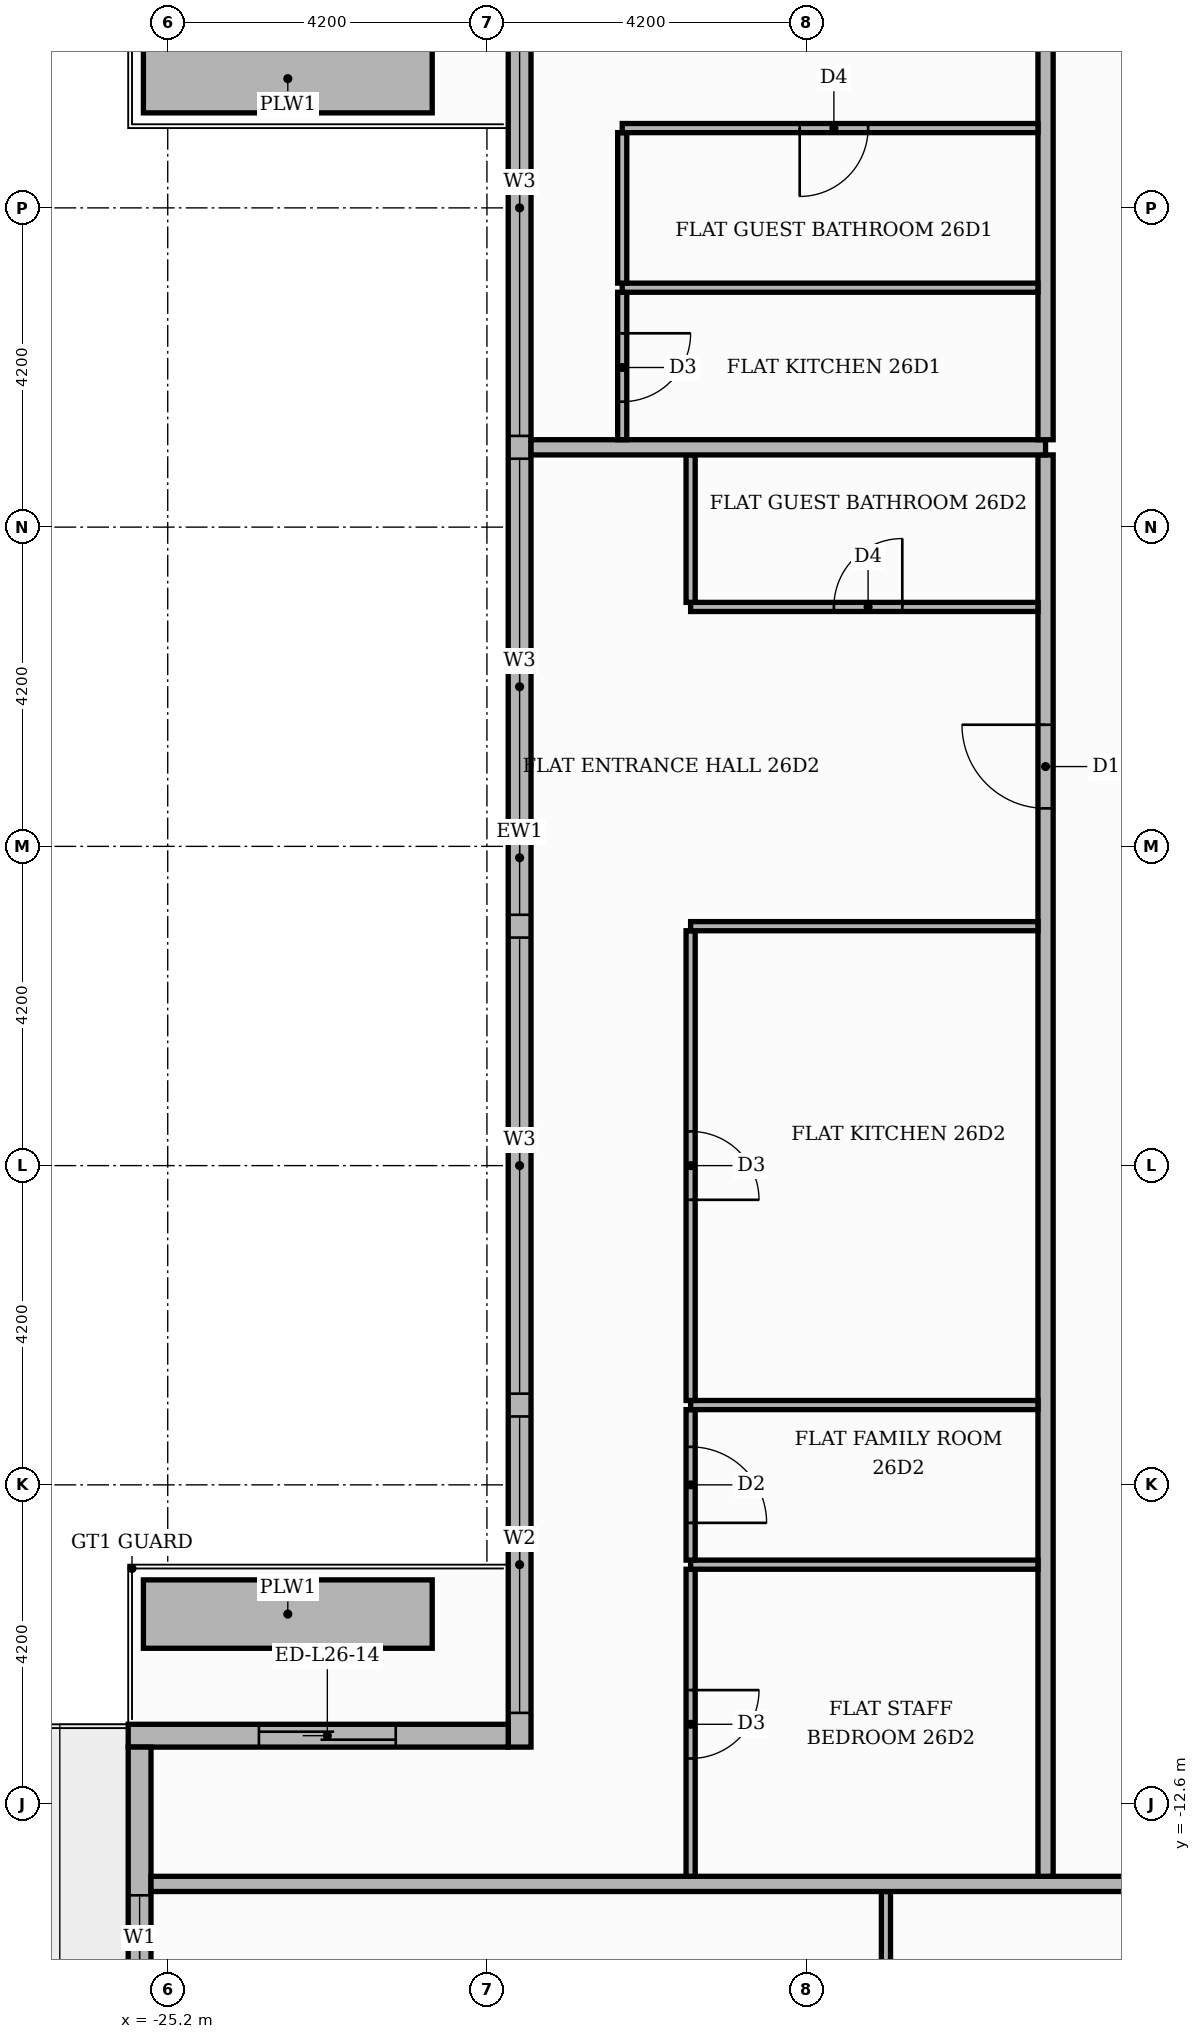
"""IFC4 building model, lengths in metres.
Left out: names, types, materials, properties, quantities, classifications, styles, units other than length and angle.
Written with IfcOpenShell. Run it as: python <this file> out.ifc"""

import sys

from ifc_helpers import new_model, si_unit, direction, frame, frame_2d, origin, place, context, subcontext, project, spatial, rectangle, extrude, element, fill, save


model = new_model("IFC4")
c1 = context("Model", 3, precision=1e-05, world=origin(), true_north=direction((0.0, 1.0)))
c2 = subcontext(c1, "Body", "Model", "MODEL_VIEW")
j1 = project(units=[si_unit("LENGTHUNIT", "METRE"), si_unit("PLANEANGLEUNIT", "RADIAN")], contexts=[c1])
p1 = place(None, origin())
s1 = spatial("IfcSite", under=j1, at=p1, CompositionType="ELEMENT")
p2 = place(p1, origin())
s2 = spatial("IfcBuilding", under=s1, at=p2, CompositionType="ELEMENT")
p3 = place(p2, frame((0.0, 0.0, 110.4)))
s3 = spatial("IfcBuildingStorey", under=s2, at=p3, CompositionType="ELEMENT", Elevation=110.4)
p4 = place(p3, frame((-20.57, 11.55, 0.0), z_axis=(0.0, 0.0, 1.0), x_axis=(0.0, -1.0, 0.0)))
e1 = element("IfcWall", 1, at=p4, inside=s3, PredefinedType="STANDARD", context=c2, shape_type="SweptSolid", body=[
    extrude(rectangle(XDim=23.4, YDim=0.3, at=frame_2d((11.7, 0.0))), origin(), (0.0, 0.0, 1.0), 3.48),
])
p5 = place(p4, frame((0.15, 0.0, 0.9)))
e2 = element("IfcOpeningElement", 2, at=p5, cuts=e1, PredefinedType="OPENING", context=c2, shape_type="SweptSolid", body=[
    extrude(rectangle(XDim=6.0, YDim=2.1, at=frame_2d((3.0, 1.05))), frame((0.0, 0.16, 0.0), z_axis=(0.0, -1.0, 0.0), x_axis=(1.0, 0.0, 0.0)), (0.0, 0.0, 1.0), 0.32),
])
p6 = place(p4, frame((6.45, 0.0, 0.9)))
e3 = element("IfcOpeningElement", 3, at=p6, cuts=e1, PredefinedType="OPENING", context=c2, shape_type="SweptSolid", body=[
    extrude(rectangle(XDim=6.0, YDim=2.1, at=frame_2d((3.0, 1.05))), frame((0.0, 0.16, 0.0), z_axis=(0.0, -1.0, 0.0), x_axis=(1.0, 0.0, 0.0)), (0.0, 0.0, 1.0), 0.32),
])
p7 = place(p4, frame((12.75, 0.0, 0.9)))
e4 = element("IfcOpeningElement", 4, at=p7, cuts=e1, PredefinedType="OPENING", context=c2, shape_type="SweptSolid", body=[
    extrude(rectangle(XDim=6.0, YDim=2.1, at=frame_2d((3.0, 1.05))), frame((0.0, 0.16, 0.0), z_axis=(0.0, -1.0, 0.0), x_axis=(1.0, 0.0, 0.0)), (0.0, 0.0, 1.0), 0.32),
])
p8 = place(p4, frame((19.05, 0.0, 0.9)))
e5 = element("IfcOpeningElement", 5, at=p8, cuts=e1, PredefinedType="OPENING", context=c2, shape_type="SweptSolid", body=[
    extrude(rectangle(XDim=3.9, YDim=2.1, at=frame_2d((1.95, 1.05))), frame((0.0, 0.16, 0.0), z_axis=(0.0, -1.0, 0.0), x_axis=(1.0, 0.0, 0.0)), (0.0, 0.0, 1.0), 0.32),
])
p9 = place(p3, frame((-20.72, -11.7, 0.0), z_axis=(0.0, 0.0, 1.0), x_axis=(-1.0, 0.0, 0.0)))
e6 = element("IfcWall", 6, at=p9, inside=s3, PredefinedType="STANDARD", context=c2, shape_type="SweptSolid", body=[
    extrude(rectangle(XDim=5.0, YDim=0.3, at=frame_2d((2.5, 0.0))), origin(), (0.0, 0.0, 1.0), 3.48),
])
p10 = place(p9, frame((1.48, 0.0, 0.0)))
e7 = element("IfcOpeningElement", 7, at=p10, cuts=e6, PredefinedType="OPENING", context=c2, shape_type="SweptSolid", body=[
    extrude(rectangle(XDim=1.8, YDim=2.4, at=frame_2d((0.9, 1.2))), frame((0.0, 0.16, 0.0), z_axis=(0.0, -1.0, 0.0), x_axis=(1.0, 0.0, 0.0)), (0.0, 0.0, 1.0), 0.32),
])
p11 = place(p3, frame((-25.57, -11.85, 0.0), z_axis=(0.0, 0.0, 1.0), x_axis=(0.0, -1.0, 0.0)))
e8 = element("IfcWall", 8, at=p11, inside=s3, PredefinedType="STANDARD", context=c2, shape_type="SweptSolid", body=[
    extrude(rectangle(XDim=4.35, YDim=0.3, at=frame_2d((2.175, 0.0))), origin(), (0.0, 0.0, 1.0), 3.48),
])
p12 = place(p11, frame((1.95, 0.0, 0.9)))
e9 = element("IfcOpeningElement", 9, at=p12, cuts=e8, PredefinedType="OPENING", context=c2, shape_type="SweptSolid", body=[
    extrude(rectangle(XDim=1.8, YDim=2.1, at=frame_2d((0.9, 1.05))), frame((0.0, 0.16, 0.0), z_axis=(0.0, -1.0, 0.0), x_axis=(1.0, 0.0, 0.0)), (0.0, 0.0, 1.0), 0.32),
])
for number, where, z_axis, x_axis in (
    (10, (-25.52, -10.1, 0.0), (0.0, 0.0, 1.0), (1.0, 0.0, 0.0)),
    (11, (-25.52, 10.1, 0.0), (0.0, 0.0, 1.0), (1.0, 0.0, 0.0)),
):
    element("IfcWall", number, at=place(p3, frame(where, z_axis=z_axis, x_axis=x_axis)), inside=s3, PredefinedType="MOVABLE", context=c2, shape_type="SweptSolid", body=[
        extrude(rectangle(XDim=3.8, YDim=0.9, at=frame_2d((1.9, 0.0))), origin(), (0.0, 0.0, 1.0), 0.6),
    ])
p13 = place(p3, frame((-15.75, -20.66, 0.0), z_axis=(0.0, 0.0, 1.0), x_axis=(0.0, 1.0, 0.0)))
e12 = element("IfcWall", 12, at=p13, inside=s3, PredefinedType="PARTITIONING", context=c2, shape_type="SweptSolid", body=[
    extrude(rectangle(XDim=6.91, YDim=0.12, at=frame_2d((3.455, 0.0))), origin(), (0.0, 0.0, 1.0), 3.48),
])
p14 = place(p13, frame((3.025, 0.0, 0.0)))
e13 = element("IfcOpeningElement", 13, at=p14, cuts=e12, PredefinedType="OPENING", context=c2, shape_type="SweptSolid", body=[
    extrude(rectangle(XDim=0.9, YDim=2.1, at=frame_2d((0.45, 1.05))), frame((0.0, 0.07, 0.0), z_axis=(0.0, -1.0, 0.0), x_axis=(1.0, 0.0, 0.0)), (0.0, 0.0, 1.0), 0.14),
])
p15 = place(p3, frame((-25.42, -13.65, 0.0), z_axis=(0.0, 0.0, 1.0), x_axis=(1.0, 0.0, 0.0)))
e14 = element("IfcWall", 14, at=p15, inside=s3, PredefinedType="PARTITIONING", context=c2, shape_type="SweptSolid", body=[
    extrude(rectangle(XDim=39.07, YDim=0.2, at=frame_2d((19.535, 0.0))), origin(), (0.0, 0.0, 1.0), 3.48),
])
p16 = place(p15, frame((13.32, 0.0, 0.0)))
e15 = element("IfcOpeningElement", 15, at=p16, cuts=e14, PredefinedType="OPENING", context=c2, shape_type="SweptSolid", body=[
    extrude(rectangle(XDim=1.1, YDim=2.4, at=frame_2d((0.55, 1.2))), frame((0.0, 0.11, 0.0), z_axis=(0.0, -1.0, 0.0), x_axis=(1.0, 0.0, 0.0)), (0.0, 0.0, 1.0), 0.22),
])
p17 = place(p3, frame((-18.32, -13.55, 0.0), z_axis=(0.0, 0.0, 1.0), x_axis=(0.0, 1.0, 0.0)))
e16 = element("IfcWall", 16, at=p17, inside=s3, PredefinedType="PARTITIONING", context=c2, shape_type="SweptSolid", body=[
    extrude(rectangle(XDim=4.04, YDim=0.12, at=frame_2d((2.02, 0.0))), origin(), (0.0, 0.0, 1.0), 3.48),
])
p18 = place(p17, frame((1.55, 0.0, 0.0)))
e17 = element("IfcOpeningElement", 17, at=p18, cuts=e16, PredefinedType="OPENING", context=c2, shape_type="SweptSolid", body=[
    extrude(rectangle(XDim=0.9, YDim=2.1, at=frame_2d((0.45, 1.05))), frame((0.0, 0.07, 0.0), z_axis=(0.0, -1.0, 0.0), x_axis=(1.0, 0.0, 0.0)), (0.0, 0.0, 1.0), 0.14),
])
p19 = place(p3, frame((-13.65, -13.55, 0.0), z_axis=(0.0, 0.0, 1.0), x_axis=(0.0, 1.0, 0.0)))
e18 = element("IfcWall", 18, at=p19, inside=s3, PredefinedType="PARTITIONING", context=c2, shape_type="SweptSolid", body=[
    extrude(rectangle(XDim=18.7, YDim=0.2, at=frame_2d((9.35, 0.0))), origin(), (0.0, 0.0, 1.0), 3.48),
])
p20 = place(p19, frame((14.05, 0.0, 0.0)))
e19 = element("IfcOpeningElement", 19, at=p20, cuts=e18, PredefinedType="OPENING", context=c2, shape_type="SweptSolid", body=[
    extrude(rectangle(XDim=1.1, YDim=2.4, at=frame_2d((0.55, 1.2))), frame((0.0, 0.11, 0.0), z_axis=(0.0, -1.0, 0.0), x_axis=(1.0, 0.0, 0.0)), (0.0, 0.0, 1.0), 0.22),
])
p21 = place(p3, frame((-18.32, -9.45, 0.0), z_axis=(0.0, 0.0, 1.0), x_axis=(1.0, 0.0, 0.0)))
e20 = element("IfcWall", 20, at=p21, inside=s3, PredefinedType="PARTITIONING", context=c2, shape_type="SweptSolid", body=[
    extrude(rectangle(XDim=4.57, YDim=0.12, at=frame_2d((2.285, 0.0))), origin(), (0.0, 0.0, 1.0), 3.48),
])
p22 = place(p3, frame((-18.32, -9.39, 0.0), z_axis=(0.0, 0.0, 1.0), x_axis=(0.0, 1.0, 0.0)))
e21 = element("IfcWall", 21, at=p22, inside=s3, PredefinedType="PARTITIONING", context=c2, shape_type="SweptSolid", body=[
    extrude(rectangle(XDim=1.98, YDim=0.12, at=frame_2d((0.99, 0.0))), origin(), (0.0, 0.0, 1.0), 3.48),
])
p23 = place(p22, frame((0.49, 0.0, 0.0)))
e22 = element("IfcOpeningElement", 22, at=p23, cuts=e21, PredefinedType="OPENING", context=c2, shape_type="SweptSolid", body=[
    extrude(rectangle(XDim=1.0, YDim=2.1, at=frame_2d((0.5, 1.05))), frame((0.0, 0.07, 0.0), z_axis=(0.0, -1.0, 0.0), x_axis=(1.0, 0.0, 0.0)), (0.0, 0.0, 1.0), 0.14),
])
p24 = place(p3, frame((-18.32, -7.35, 0.0), z_axis=(0.0, 0.0, 1.0), x_axis=(1.0, 0.0, 0.0)))
e23 = element("IfcWall", 23, at=p24, inside=s3, PredefinedType="PARTITIONING", context=c2, shape_type="SweptSolid", body=[
    extrude(rectangle(XDim=4.57, YDim=0.12, at=frame_2d((2.285, 0.0))), origin(), (0.0, 0.0, 1.0), 3.48),
])
p25 = place(p3, frame((-18.32, -7.29, 0.0), z_axis=(0.0, 0.0, 1.0), x_axis=(0.0, 1.0, 0.0)))
e24 = element("IfcWall", 24, at=p25, inside=s3, PredefinedType="PARTITIONING", context=c2, shape_type="SweptSolid", body=[
    extrude(rectangle(XDim=6.18, YDim=0.12, at=frame_2d((3.09, 0.0))), origin(), (0.0, 0.0, 1.0), 3.48),
])
p26 = place(p25, frame((2.64, 0.0, 0.0)))
e25 = element("IfcOpeningElement", 25, at=p26, cuts=e24, PredefinedType="OPENING", context=c2, shape_type="SweptSolid", body=[
    extrude(rectangle(XDim=0.9, YDim=2.1, at=frame_2d((0.45, 1.05))), frame((0.0, 0.07, 0.0), z_axis=(0.0, -1.0, 0.0), x_axis=(1.0, 0.0, 0.0)), (0.0, 0.0, 1.0), 0.14),
])
p27 = place(p3, frame((-18.32, -1.05, 0.0), z_axis=(0.0, 0.0, 1.0), x_axis=(1.0, 0.0, 0.0)))
e26 = element("IfcWall", 26, at=p27, inside=s3, PredefinedType="PARTITIONING", context=c2, shape_type="SweptSolid", body=[
    extrude(rectangle(XDim=4.57, YDim=0.12, at=frame_2d((2.285, 0.0))), origin(), (0.0, 0.0, 1.0), 3.48),
])
p28 = place(p3, frame((-18.32, 3.15, 0.0), z_axis=(0.0, 0.0, 1.0), x_axis=(1.0, 0.0, 0.0)))
e27 = element("IfcWall", 27, at=p28, inside=s3, PredefinedType="PARTITIONING", context=c2, shape_type="SweptSolid", body=[
    extrude(rectangle(XDim=4.57, YDim=0.12, at=frame_2d((2.285, 0.0))), origin(), (0.0, 0.0, 1.0), 3.48),
])
p29 = place(p28, frame((1.885, 0.0, 0.0)))
e28 = element("IfcOpeningElement", 28, at=p29, cuts=e27, PredefinedType="OPENING", context=c2, shape_type="SweptSolid", body=[
    extrude(rectangle(XDim=0.9, YDim=2.1, at=frame_2d((0.45, 1.05))), frame((0.0, 0.07, 0.0), z_axis=(0.0, -1.0, 0.0), x_axis=(1.0, 0.0, 0.0)), (0.0, 0.0, 1.0), 0.14),
])
p30 = place(p3, frame((-18.32, 3.21, 0.0), z_axis=(0.0, 0.0, 1.0), x_axis=(0.0, 1.0, 0.0)))
e29 = element("IfcWall", 29, at=p30, inside=s3, PredefinedType="PARTITIONING", context=c2, shape_type="SweptSolid", body=[
    extrude(rectangle(XDim=1.94, YDim=0.12, at=frame_2d((0.97, 0.0))), origin(), (0.0, 0.0, 1.0), 3.48),
])
p31 = place(p3, frame((-20.42, 5.25, 0.0), z_axis=(0.0, 0.0, 1.0), x_axis=(1.0, 0.0, 0.0)))
e30 = element("IfcWall", 30, at=p31, inside=s3, PredefinedType="PARTITIONING", context=c2, shape_type="SweptSolid", body=[
    extrude(rectangle(XDim=6.77, YDim=0.2, at=frame_2d((3.385, 0.0))), origin(), (0.0, 0.0, 1.0), 3.48),
])
p32 = place(p3, frame((-19.22, 5.35, 0.0), z_axis=(0.0, 0.0, 1.0), x_axis=(0.0, 1.0, 0.0)))
e31 = element("IfcWall", 31, at=p32, inside=s3, PredefinedType="PARTITIONING", context=c2, shape_type="SweptSolid", body=[
    extrude(rectangle(XDim=1.94, YDim=0.12, at=frame_2d((0.97, 0.0))), origin(), (0.0, 0.0, 1.0), 3.48),
])
p33 = place(p32, frame((0.5, 0.0, 0.0)))
e32 = element("IfcOpeningElement", 32, at=p33, cuts=e31, PredefinedType="OPENING", context=c2, shape_type="SweptSolid", body=[
    extrude(rectangle(XDim=0.9, YDim=2.1, at=frame_2d((0.45, 1.05))), frame((0.0, 0.07, 0.0), z_axis=(0.0, -1.0, 0.0), x_axis=(1.0, 0.0, 0.0)), (0.0, 0.0, 1.0), 0.14),
])
p34 = place(p3, frame((-13.65, 5.35, 0.0), z_axis=(0.0, 0.0, 1.0), x_axis=(0.0, 1.0, 0.0)))
e33 = element("IfcWall", 33, at=p34, inside=s3, PredefinedType="PARTITIONING", context=c2, shape_type="SweptSolid", body=[
    extrude(rectangle(XDim=8.2, YDim=0.2, at=frame_2d((4.1, 0.0))), origin(), (0.0, 0.0, 1.0), 3.48),
])
p35 = place(p34, frame((5.65, 0.0, 0.0)))
e34 = element("IfcOpeningElement", 34, at=p35, cuts=e33, PredefinedType="OPENING", context=c2, shape_type="SweptSolid", body=[
    extrude(rectangle(XDim=1.1, YDim=2.4, at=frame_2d((0.55, 1.2))), frame((0.0, 0.11, 0.0), z_axis=(0.0, -1.0, 0.0), x_axis=(1.0, 0.0, 0.0)), (0.0, 0.0, 1.0), 0.22),
])
p36 = place(p3, frame((-19.22, 7.35, 0.0), z_axis=(0.0, 0.0, 1.0), x_axis=(1.0, 0.0, 0.0)))
e35 = element("IfcWall", 35, at=p36, inside=s3, PredefinedType="PARTITIONING", context=c2, shape_type="SweptSolid", body=[
    extrude(rectangle(XDim=5.47, YDim=0.12, at=frame_2d((2.735, 0.0))), origin(), (0.0, 0.0, 1.0), 3.48),
])
p37 = place(p3, frame((-19.22, 7.41, 0.0), z_axis=(0.0, 0.0, 1.0), x_axis=(0.0, 1.0, 0.0)))
e36 = element("IfcWall", 36, at=p37, inside=s3, PredefinedType="PARTITIONING", context=c2, shape_type="SweptSolid", body=[
    extrude(rectangle(XDim=1.98, YDim=0.12, at=frame_2d((0.99, 0.0))), origin(), (0.0, 0.0, 1.0), 3.48),
])
p38 = place(p3, frame((-19.22, 9.45, 0.0), z_axis=(0.0, 0.0, 1.0), x_axis=(1.0, 0.0, 0.0)))
e37 = element("IfcWall", 37, at=p38, inside=s3, PredefinedType="PARTITIONING", context=c2, shape_type="SweptSolid", body=[
    extrude(rectangle(XDim=5.47, YDim=0.12, at=frame_2d((2.735, 0.0))), origin(), (0.0, 0.0, 1.0), 3.48),
])
p39 = place(p38, frame((2.335, 0.0, 0.0)))
e38 = element("IfcOpeningElement", 38, at=p39, cuts=e37, PredefinedType="OPENING", context=c2, shape_type="SweptSolid", body=[
    extrude(rectangle(XDim=0.9, YDim=2.1, at=frame_2d((0.45, 1.05))), frame((0.0, 0.07, 0.0), z_axis=(0.0, -1.0, 0.0), x_axis=(1.0, 0.0, 0.0)), (0.0, 0.0, 1.0), 0.14),
])
p40 = place(p5, origin())
e39 = element("IfcWindow", 39, at=p40, inside=s3, PartitioningType="SINGLE_PANEL", PredefinedType="WINDOW", context=c2, shape_type="SweptSolid", body=[
    extrude(rectangle(XDim=6.0, YDim=2.1, at=frame_2d((3.0, 1.05))), frame((0.0, 0.03, 0.0), z_axis=(0.0, -1.0, 0.0), x_axis=(1.0, 0.0, 0.0)), (0.0, 0.0, 1.0), 0.06),
])
fill(e2, e39)
p41 = place(p6, origin())
e40 = element("IfcWindow", 40, at=p41, inside=s3, PartitioningType="SINGLE_PANEL", PredefinedType="WINDOW", context=c2, shape_type="SweptSolid", body=[
    extrude(rectangle(XDim=6.0, YDim=2.1, at=frame_2d((3.0, 1.05))), frame((0.0, 0.03, 0.0), z_axis=(0.0, -1.0, 0.0), x_axis=(1.0, 0.0, 0.0)), (0.0, 0.0, 1.0), 0.06),
])
fill(e3, e40)
p42 = place(p7, origin())
e41 = element("IfcWindow", 41, at=p42, inside=s3, PartitioningType="SINGLE_PANEL", PredefinedType="WINDOW", context=c2, shape_type="SweptSolid", body=[
    extrude(rectangle(XDim=6.0, YDim=2.1, at=frame_2d((3.0, 1.05))), frame((0.0, 0.03, 0.0), z_axis=(0.0, -1.0, 0.0), x_axis=(1.0, 0.0, 0.0)), (0.0, 0.0, 1.0), 0.06),
])
fill(e4, e41)
p43 = place(p8, origin())
e42 = element("IfcWindow", 42, at=p43, inside=s3, PartitioningType="SINGLE_PANEL", PredefinedType="WINDOW", context=c2, shape_type="SweptSolid", body=[
    extrude(rectangle(XDim=3.9, YDim=2.1, at=frame_2d((1.95, 1.05))), frame((0.0, 0.03, 0.0), z_axis=(0.0, -1.0, 0.0), x_axis=(1.0, 0.0, 0.0)), (0.0, 0.0, 1.0), 0.06),
])
fill(e5, e42)
p44 = place(p10, origin())
e43 = element("IfcDoor", 43, at=p44, inside=s3, OperationType="SLIDING_TO_RIGHT", PredefinedType="DOOR", context=c2, shape_type="SweptSolid", body=[
    extrude(rectangle(XDim=1.8, YDim=2.4, at=frame_2d((0.9, 1.2))), frame((0.0, 0.025, 0.0), z_axis=(0.0, -1.0, 0.0), x_axis=(1.0, 0.0, 0.0)), (0.0, 0.0, 1.0), 0.05),
])
fill(e7, e43)
p45 = place(p12, origin())
e44 = element("IfcWindow", 44, at=p45, inside=s3, PartitioningType="SINGLE_PANEL", PredefinedType="WINDOW", context=c2, shape_type="SweptSolid", body=[
    extrude(rectangle(XDim=1.8, YDim=2.1, at=frame_2d((0.9, 1.05))), frame((0.0, 0.03, 0.0), z_axis=(0.0, -1.0, 0.0), x_axis=(1.0, 0.0, 0.0)), (0.0, 0.0, 1.0), 0.06),
])
fill(e9, e44)
p46 = place(p39, frame((0.9, 0.0, 0.0), z_axis=(0.0, 0.0, 1.0), x_axis=(-1.0, 0.0, 0.0)))
e45 = element("IfcDoor", 45, at=p46, inside=s3, OperationType="SINGLE_SWING_LEFT", PredefinedType="DOOR", context=c2, shape_type="SweptSolid", body=[
    extrude(rectangle(XDim=0.9, YDim=2.1, at=frame_2d((0.45, 1.05))), frame((0.0, 0.025, 0.0), z_axis=(0.0, -1.0, 0.0), x_axis=(1.0, 0.0, 0.0)), (0.0, 0.0, 1.0), 0.05),
])
fill(e38, e45)
p47 = place(p33, frame((0.9, 0.0, 0.0), z_axis=(0.0, 0.0, 1.0), x_axis=(-1.0, 0.0, 0.0)))
e46 = element("IfcDoor", 46, at=p47, inside=s3, OperationType="SINGLE_SWING_RIGHT", PredefinedType="DOOR", context=c2, shape_type="SweptSolid", body=[
    extrude(rectangle(XDim=0.9, YDim=2.1, at=frame_2d((0.45, 1.05))), frame((0.0, 0.025, 0.0), z_axis=(0.0, -1.0, 0.0), x_axis=(1.0, 0.0, 0.0)), (0.0, 0.0, 1.0), 0.05),
])
fill(e32, e46)
p48 = place(p20, origin())
e47 = element("IfcDoor", 47, at=p48, inside=s3, OperationType="SINGLE_SWING_RIGHT", PredefinedType="DOOR", context=c2, shape_type="SweptSolid", body=[
    extrude(rectangle(XDim=1.1, YDim=2.4, at=frame_2d((0.55, 1.2))), frame((0.0, 0.025, 0.0), z_axis=(0.0, -1.0, 0.0), x_axis=(1.0, 0.0, 0.0)), (0.0, 0.0, 1.0), 0.05),
])
fill(e19, e47)
p49 = place(p29, origin())
e48 = element("IfcDoor", 48, at=p49, inside=s3, OperationType="SINGLE_SWING_RIGHT", PredefinedType="DOOR", context=c2, shape_type="SweptSolid", body=[
    extrude(rectangle(XDim=0.9, YDim=2.1, at=frame_2d((0.45, 1.05))), frame((0.0, 0.025, 0.0), z_axis=(0.0, -1.0, 0.0), x_axis=(1.0, 0.0, 0.0)), (0.0, 0.0, 1.0), 0.05),
])
fill(e28, e48)
p50 = place(p26, frame((0.9, 0.0, 0.0), z_axis=(0.0, 0.0, 1.0), x_axis=(-1.0, 0.0, 0.0)))
e49 = element("IfcDoor", 49, at=p50, inside=s3, OperationType="SINGLE_SWING_LEFT", PredefinedType="DOOR", context=c2, shape_type="SweptSolid", body=[
    extrude(rectangle(XDim=0.9, YDim=2.1, at=frame_2d((0.45, 1.05))), frame((0.0, 0.025, 0.0), z_axis=(0.0, -1.0, 0.0), x_axis=(1.0, 0.0, 0.0)), (0.0, 0.0, 1.0), 0.05),
])
fill(e25, e49)
p51 = place(p23, frame((1.0, 0.0, 0.0), z_axis=(0.0, 0.0, 1.0), x_axis=(-1.0, 0.0, 0.0)))
e50 = element("IfcDoor", 50, at=p51, inside=s3, OperationType="SINGLE_SWING_LEFT", PredefinedType="DOOR", context=c2, shape_type="SweptSolid", body=[
    extrude(rectangle(XDim=1.0, YDim=2.1, at=frame_2d((0.5, 1.05))), frame((0.0, 0.025, 0.0), z_axis=(0.0, -1.0, 0.0), x_axis=(1.0, 0.0, 0.0)), (0.0, 0.0, 1.0), 0.05),
])
fill(e22, e50)
p52 = place(p18, frame((0.9, 0.0, 0.0), z_axis=(0.0, 0.0, 1.0), x_axis=(-1.0, 0.0, 0.0)))
e51 = element("IfcDoor", 51, at=p52, inside=s3, OperationType="SINGLE_SWING_RIGHT", PredefinedType="DOOR", context=c2, shape_type="SweptSolid", body=[
    extrude(rectangle(XDim=0.9, YDim=2.1, at=frame_2d((0.45, 1.05))), frame((0.0, 0.025, 0.0), z_axis=(0.0, -1.0, 0.0), x_axis=(1.0, 0.0, 0.0)), (0.0, 0.0, 1.0), 0.05),
])
fill(e17, e51)
save(model, sys.argv[1])
